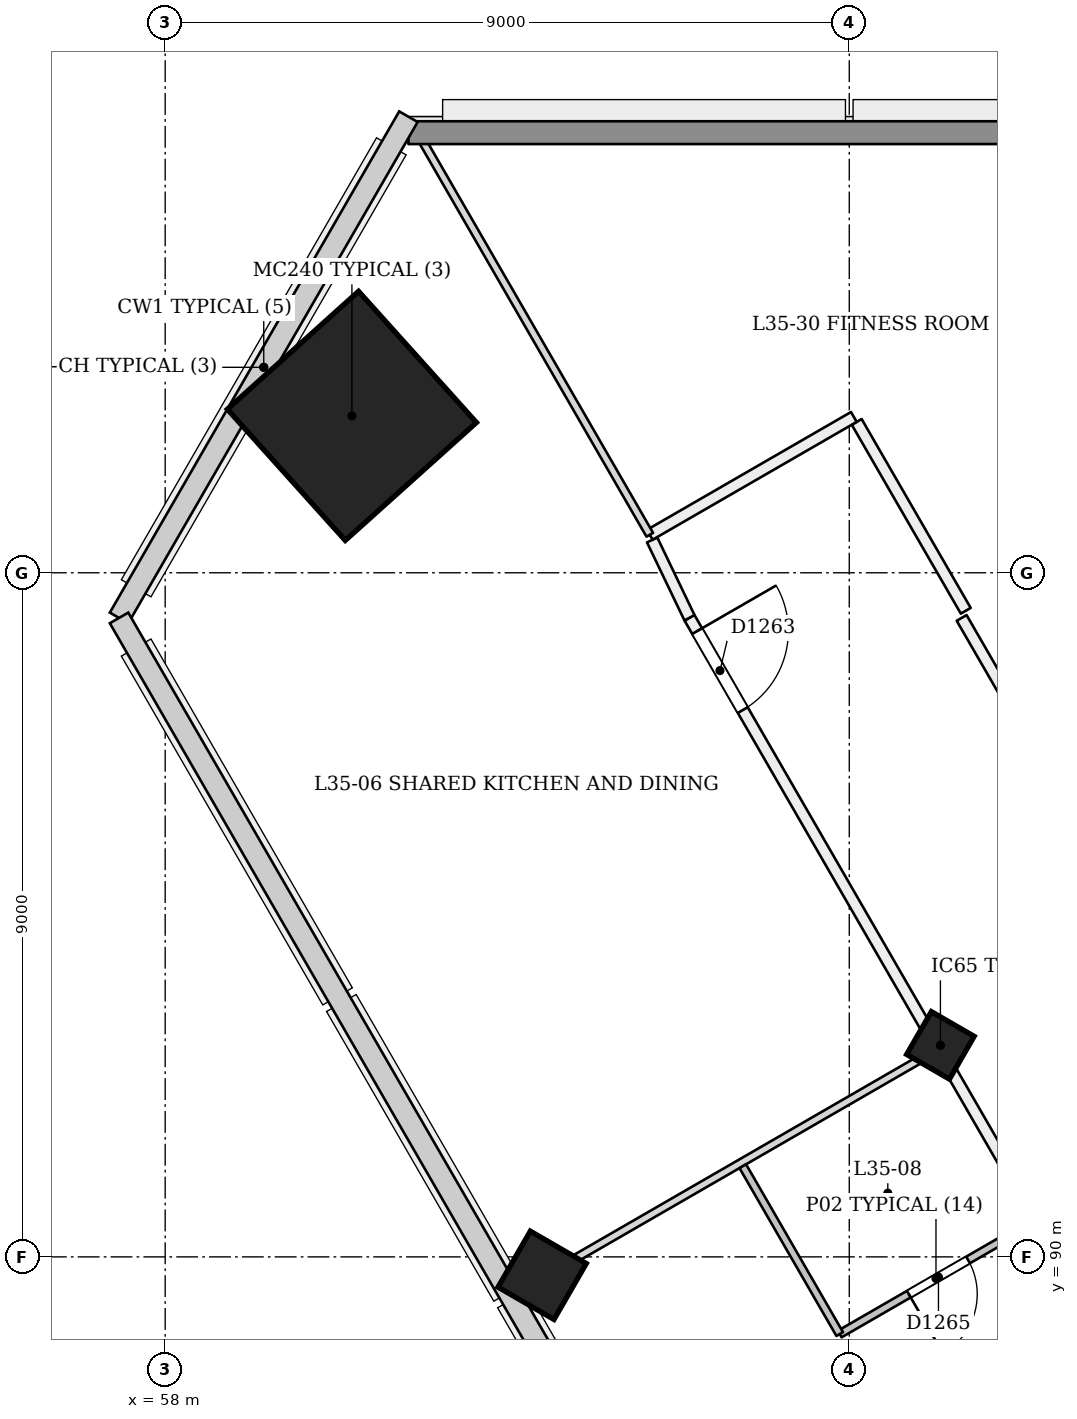
"""IFC4 building model, lengths in metres.
Left out: names, types, materials, properties, quantities, classifications, styles, units other than length and angle.
Written with IfcOpenShell. Run it as: python <this file> out.ifc"""

import sys

from ifc_helpers import new_model, si_unit, direction, frame, frame_2d, origin, origin_2d, place, context, subcontext, project, spatial, rectangle, extrude, element, fill, save


model = new_model("IFC4")
c1 = context("Model", 3, precision=1e-05, world=origin(), true_north=direction((0.0, 1.0)))
c2 = subcontext(c1, "Body", "Model", "MODEL_VIEW")
j1 = project(units=[si_unit("LENGTHUNIT", "METRE"), si_unit("PLANEANGLEUNIT", "RADIAN")], contexts=[c1])
p1 = place(None, origin())
s1 = spatial("IfcSite", under=j1, at=p1, CompositionType="ELEMENT")
p2 = place(p1, origin())
s2 = spatial("IfcBuilding", under=s1, at=p2, CompositionType="ELEMENT")
p3 = place(p2, frame((0.0, 0.0, 138.6)))
s3 = spatial("IfcBuildingStorey", under=s2, at=p3, CompositionType="ELEMENT", Elevation=138.6)
p4 = place(p3, frame((68.172, 92.736, -0.02), z_axis=(0.022222910879, 0.038415824599, 0.999014697916), x_axis=(-0.866024016249, -0.498523002016, 0.038434616444)))
e1 = element("IfcColumn", 1, at=p4, inside=s3, PredefinedType="COLUMN", context=c2, shape_type="SweptSolid", body=[
    extrude(rectangle(XDim=0.65, YDim=0.65, at=origin_2d()), origin(), (0.0, 0.0, 1.0), 3.604),
])
p5 = place(p3, frame((60.423, 101.053, 0.0), z_axis=(0.028403721265, 0.009287135593, 0.999553389135), x_axis=(-0.866201877506, 0.49929479911, 0.019975259356)))
e2 = element("IfcColumn", 2, at=p5, inside=s3, PredefinedType="COLUMN", context=c2, shape_type="SweptSolid", body=[
    extrude(rectangle(XDim=2.32, YDim=2.32, at=origin_2d()), origin(), (0.0, 0.0, 1.0), 3.602),
])
p6 = place(p3, frame((62.932, 89.71, -0.026), z_axis=(0.022153634206, 0.038480930364, 0.999013730882), x_axis=(-0.864982414942, -0.500326646225, 0.038453464312)))
e3 = element("IfcColumn", 3, at=p6, inside=s3, PredefinedType="COLUMN", context=c2, shape_type="SweptSolid", body=[
    extrude(rectangle(XDim=0.85, YDim=0.85, at=origin_2d()), origin(), (0.0, 0.0, 1.0), 3.604),
])
p7 = place(p3, frame((64.407, 99.432, 0.0), z_axis=(0.0, 0.0, 1.0), x_axis=(0.432647343943, -0.901563240033, 0.0)))
e4 = element("IfcWall", 4, at=p7, inside=s3, PredefinedType="PARTITIONING", context=c2, shape_type="SweptSolid", body=[
    extrude(rectangle(XDim=1.138, YDim=0.15, at=frame_2d((0.569, 0.0))), origin(), (0.0, 0.0, 1.0), 3.15),
])
p8 = place(p3, frame((64.899, 98.406, 0.0), z_axis=(0.0, 0.0, 1.0), x_axis=(0.499995137693, -0.86602821102, 0.0)))
e5 = element("IfcWall", 5, at=p8, inside=s3, PredefinedType="PARTITIONING", context=c2, shape_type="SweptSolid", body=[
    extrude(rectangle(XDim=40.094, YDim=0.15, at=frame_2d((20.047, 0.0))), origin(), (0.0, 0.0, 1.0), 2.75),
])
p9 = place(p8, frame((0.2, 0.0, 0.0)))
e6 = element("IfcOpeningElement", 6, at=p9, cuts=e5, PredefinedType="OPENING", context=c2, shape_type="SweptSolid", body=[
    extrude(rectangle(XDim=1.2, YDim=2.1, at=frame_2d((0.6, 1.05))), frame((0.0, 0.085, 0.0), z_axis=(0.0, -1.0, 0.0), x_axis=(1.0, 0.0, 0.0)), (0.0, 0.0, 1.0), 0.171),
])
p10 = place(p8, frame((9.442, 0.0, 0.0)))
e7 = element("IfcOpeningElement", 7, at=p10, cuts=e5, PredefinedType="OPENING", context=c2, shape_type="SweptSolid", body=[
    extrude(rectangle(XDim=1.0, YDim=2.1, at=frame_2d((0.5, 1.05))), frame((0.0, 0.085, 0.0), z_axis=(0.0, -1.0, 0.0), x_axis=(1.0, 0.0, 0.0)), (0.0, 0.0, 1.0), 0.171),
])
p11 = place(p8, frame((11.652, 0.0, 0.0)))
e8 = element("IfcOpeningElement", 8, at=p11, cuts=e5, PredefinedType="OPENING", context=c2, shape_type="SweptSolid", body=[
    extrude(rectangle(XDim=1.0, YDim=2.1, at=frame_2d((0.5, 1.05))), frame((0.0, 0.085, 0.0), z_axis=(0.0, -1.0, 0.0), x_axis=(1.0, 0.0, 0.0)), (0.0, 0.0, 1.0), 0.171),
])
p12 = place(p8, frame((19.447, 0.0, 0.0)))
e9 = element("IfcOpeningElement", 9, at=p12, cuts=e5, PredefinedType="OPENING", context=c2, shape_type="SweptSolid", body=[
    extrude(rectangle(XDim=1.2, YDim=2.1, at=frame_2d((0.6, 1.05))), frame((0.0, 0.085, 0.0), z_axis=(0.0, -1.0, 0.0), x_axis=(1.0, 0.0, 0.0)), (0.0, 0.0, 1.0), 0.171),
])
p13 = place(p8, frame((27.327, 0.0, 0.0)))
e10 = element("IfcOpeningElement", 10, at=p13, cuts=e5, PredefinedType="OPENING", context=c2, shape_type="SweptSolid", body=[
    extrude(rectangle(XDim=1.0, YDim=2.1, at=frame_2d((0.5, 1.05))), frame((0.0, 0.085, 0.0), z_axis=(0.0, -1.0, 0.0), x_axis=(1.0, 0.0, 0.0)), (0.0, 0.0, 1.0), 0.171),
])
p14 = place(p8, frame((31.847, 0.0, 0.0)))
e11 = element("IfcOpeningElement", 11, at=p14, cuts=e5, PredefinedType="OPENING", context=c2, shape_type="SweptSolid", body=[
    extrude(rectangle(XDim=1.2, YDim=2.1, at=frame_2d((0.6, 1.05))), frame((0.0, 0.085, 0.0), z_axis=(0.0, -1.0, 0.0), x_axis=(1.0, 0.0, 0.0)), (0.0, 0.0, 1.0), 0.171),
])
p15 = place(p8, frame((38.558, 0.0, 0.0)))
e12 = element("IfcOpeningElement", 12, at=p15, cuts=e5, PredefinedType="OPENING", context=c2, shape_type="SweptSolid", body=[
    extrude(rectangle(XDim=1.0, YDim=2.1, at=frame_2d((0.5, 1.05))), frame((0.0, 0.085, 0.0), z_axis=(0.0, -1.0, 0.0), x_axis=(1.0, 0.0, 0.0)), (0.0, 0.0, 1.0), 0.171),
])
p16 = place(p3, frame((70.06, 95.667, 0.0), z_axis=(0.0, 0.0, 1.0), x_axis=(-0.499998569178, 0.866026229868, 0.0)))
e13 = element("IfcWall", 13, at=p16, inside=s3, PredefinedType="PARTITIONING", context=c2, shape_type="SweptSolid", body=[
    extrude(rectangle(XDim=3.164, YDim=0.15, at=frame_2d((1.582, 0.0))), origin(), (0.0, 0.0, 1.0), 3.15),
])
p17 = place(p3, frame((68.532, 98.5, 0.0), z_axis=(0.0, 0.0, 1.0), x_axis=(-0.499945861543, 0.866056658381, 0.0)))
e14 = element("IfcWall", 14, at=p17, inside=s3, PredefinedType="PARTITIONING", context=c2, shape_type="SweptSolid", body=[
    extrude(rectangle(XDim=2.869, YDim=0.15, at=frame_2d((1.435, 0.0))), origin(), (0.0, 0.0, 1.0), 3.15),
])
p18 = place(p3, frame((67.06, 101.05, 0.0), z_axis=(0.0, 0.0, 1.0), x_axis=(-0.86600983753, -0.500026960575, 0.0)))
e15 = element("IfcWall", 15, at=p18, inside=s3, PredefinedType="PARTITIONING", context=c2, shape_type="SweptSolid", body=[
    extrude(rectangle(XDim=3.1, YDim=0.15, at=frame_2d((1.55, 0.0))), origin(), (0.0, 0.0, 1.0), 3.15),
])
p19 = place(p3, frame((62.63, 89.536, 0.0), z_axis=(0.0, 0.0, 1.0), x_axis=(0.866042250622, 0.499970819286, 0.0)))
e16 = element("IfcWall", 16, at=p19, inside=s3, PredefinedType="PARTITIONING", context=c2, shape_type="SweptSolid", body=[
    extrude(rectangle(XDim=6.325, YDim=0.1, at=frame_2d((3.163, 0.0))), origin(), (0.0, 0.0, 1.0), 2.65),
])
p20 = place(p3, frame((64.376, 99.5, 0.0), z_axis=(0.0, 0.0, 1.0), x_axis=(-0.500004896655, 0.866022576681, 0.0)))
e17 = element("IfcWall", 17, at=p20, inside=s3, PredefinedType="PARTITIONING", context=c2, shape_type="SweptSolid", body=[
    extrude(rectangle(XDim=6.235, YDim=0.1, at=frame_2d((3.118, 0.0))), origin(), (0.0, 0.0, 1.0), 2.65),
])
p21 = place(p3, frame((69.407, 90.447, 0.0), z_axis=(0.0, 0.0, 1.0), x_axis=(-0.866046596414, -0.499963291492, 0.0)))
e18 = element("IfcWall", 18, at=p21, inside=s3, PredefinedType="PARTITIONING", context=c2, shape_type="SweptSolid", body=[
    extrude(rectangle(XDim=2.925, YDim=0.1, at=frame_2d((1.462, 0.0))), origin(), (0.0, 0.0, 1.0), 3.15),
])
p22 = place(p21, frame((0.975, 0.0, 0.0)))
e19 = element("IfcOpeningElement", 19, at=p22, cuts=e18, PredefinedType="OPENING", context=c2, shape_type="SweptSolid", body=[
    extrude(rectangle(XDim=0.9, YDim=2.1, at=frame_2d((0.45, 1.05))), frame((0.0, 0.061, 0.0), z_axis=(0.0, -1.0, 0.0), x_axis=(1.0, 0.0, 0.0)), (0.0, 0.0, 1.0), 0.121),
])
p23 = place(p3, frame((66.874, 88.985, 0.0), z_axis=(0.0, 0.0, 1.0), x_axis=(-0.500062241894, 0.865989465428, 0.0)))
e20 = element("IfcWall", 20, at=p23, inside=s3, PredefinedType="PARTITIONING", context=c2, shape_type="SweptSolid", body=[
    extrude(rectangle(XDim=2.55, YDim=0.1, at=frame_2d((1.275, 0.0))), origin(), (0.0, 0.0, 1.0), 2.75),
])
p24 = place(p3, frame((61.2, 104.79, 0.0), z_axis=(0.0, 0.0, 1.0), x_axis=(1.0, 0.0, 0.0)))
e21 = element("IfcWall", 21, at=p24, inside=s3, PredefinedType="SOLIDWALL", context=c2, shape_type="SweptSolid", body=[
    extrude(rectangle(XDim=47.6, YDim=0.3, at=frame_2d((23.8, 0.0))), origin(), (0.0, 0.0, 1.0), 2.65),
])
p25 = place(p9, origin())
e22 = element("IfcDoor", 22, at=p25, inside=s3, OperationType="SINGLE_SWING_LEFT", PredefinedType="NOTDEFINED", context=c2, shape_type="SweptSolid", body=[
    extrude(rectangle(XDim=1.2, YDim=2.1, at=frame_2d((0.6, 1.05))), frame((0.0, 0.025, 0.0), z_axis=(0.0, -1.0, 0.0), x_axis=(1.0, 0.0, 0.0)), (0.0, 0.0, 1.0), 0.05),
])
fill(e6, e22)
p26 = place(p22, origin())
e23 = element("IfcDoor", 23, at=p26, inside=s3, OperationType="SINGLE_SWING_RIGHT", PredefinedType="NOTDEFINED", context=c2, shape_type="SweptSolid", body=[
    extrude(rectangle(XDim=0.9, YDim=2.1, at=frame_2d((0.45, 1.05))), frame((0.0, 0.025, 0.0), z_axis=(0.0, -1.0, 0.0), x_axis=(1.0, 0.0, 0.0)), (0.0, 0.0, 1.0), 0.05),
])
fill(e19, e23)
save(model, sys.argv[1])
